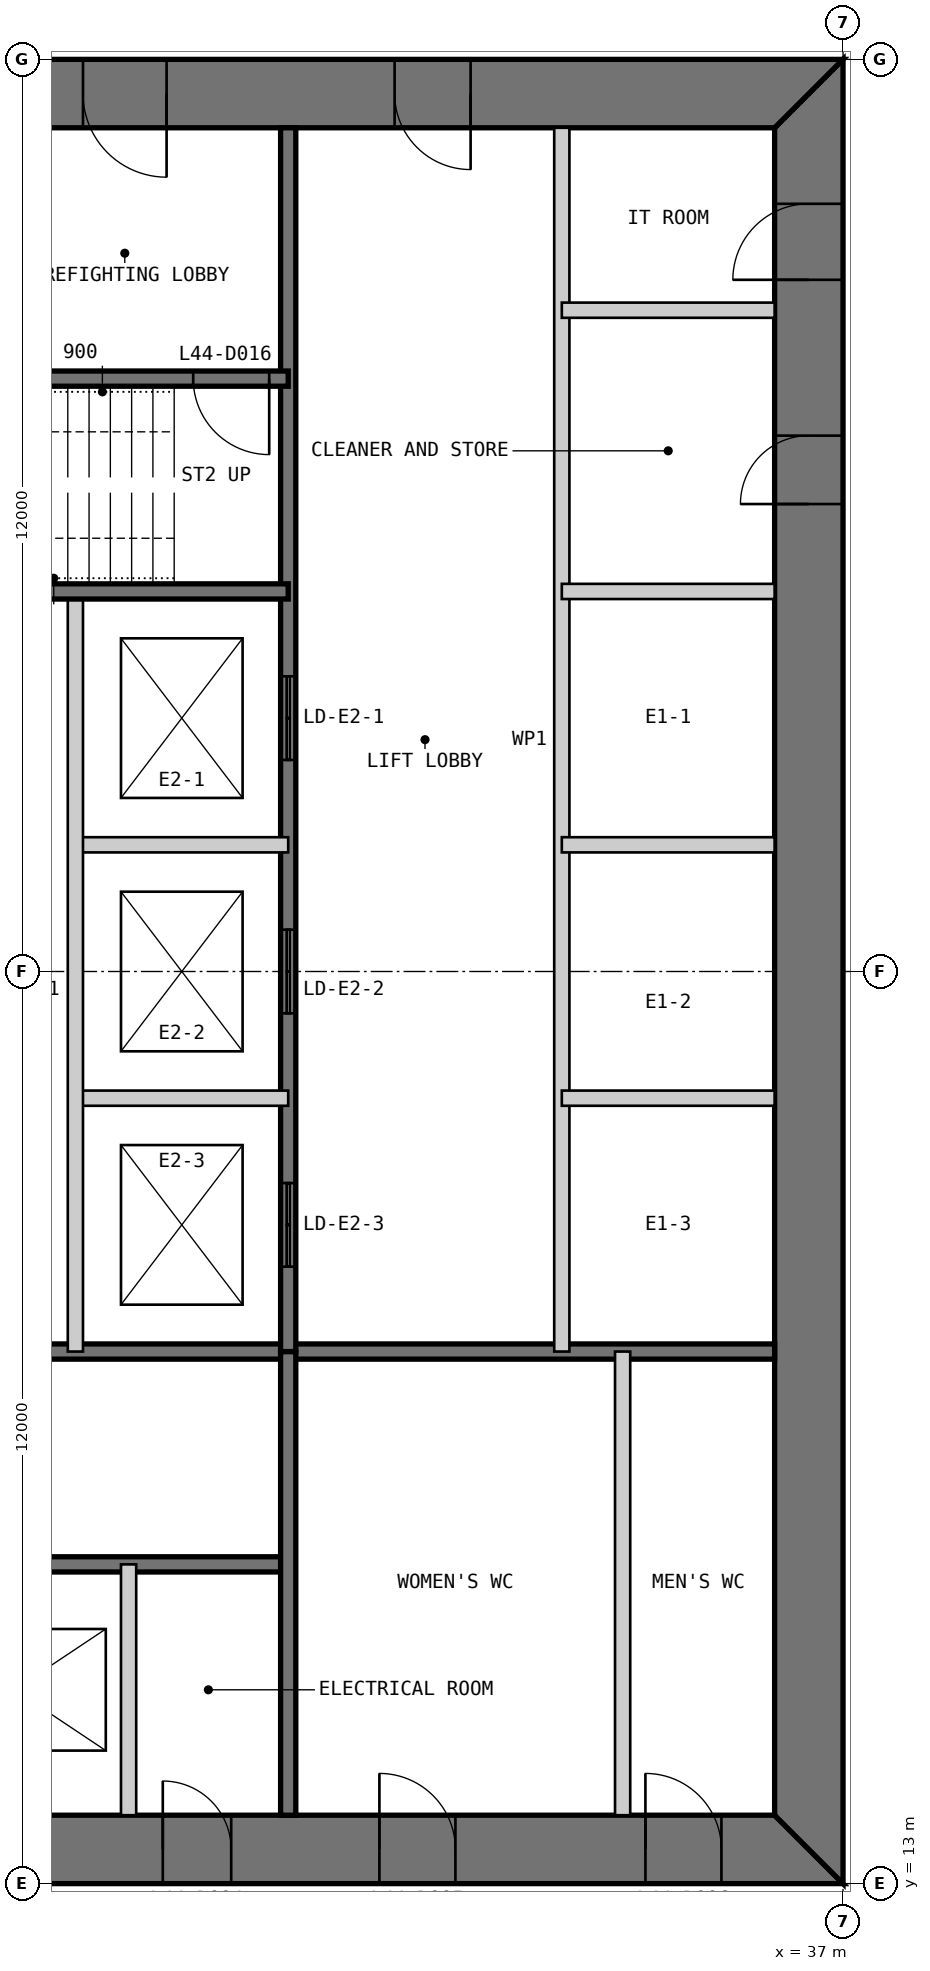
"""IFC4 building model, lengths in metres.
Left out: names, types, materials, properties, quantities, classifications, styles, units other than length and angle.
Written with IfcOpenShell. Run it as: python <this file> out.ifc"""

import sys

from ifc_helpers import new_model, si_unit, direction, frame, frame_2d, origin, place, context, subcontext, project, spatial, polyline, rectangle, outline, extrude, element, fill, save


model = new_model("IFC4")
c1 = context("Model", 3, precision=1e-05, world=origin(), true_north=direction((0.0, 1.0)))
c2 = subcontext(c1, "Body", "Model", "MODEL_VIEW")
j1 = project(units=[si_unit("LENGTHUNIT", "METRE"), si_unit("PLANEANGLEUNIT", "RADIAN")], contexts=[c1])
p1 = place(None, origin())
s1 = spatial("IfcSite", under=j1, at=p1, CompositionType="ELEMENT")
p2 = place(p1, origin())
s2 = spatial("IfcBuilding", under=s1, at=p2, CompositionType="ELEMENT")
p3 = place(p2, frame((0.0, 0.0, 189.8)))
s3 = spatial("IfcBuildingStorey", under=s2, at=p3, CompositionType="ELEMENT", Elevation=189.8)
p4 = place(p3, frame((13.0, 13.45, 0.0), z_axis=(0.0, 0.0, 1.0), x_axis=(1.0, 0.0, 0.0)))
e1 = element("IfcWall", 1, at=p4, inside=s3, PredefinedType="SHEAR", context=c2, shape_type="SweptSolid", body=[
    extrude(outline(polyline([(0.0, -0.45), (24.0, -0.45), (23.1, 0.45), (0.9, 0.45), (0.0, -0.45)])), origin(), (0.0, 0.0, 1.0), 4.0),
])
p5 = place(p4, frame((4.9, 0.0, 0.0)))
e2 = element("IfcOpeningElement", 2, at=p5, cuts=e1, PredefinedType="OPENING", context=c2, shape_type="SweptSolid", body=[
    extrude(rectangle(XDim=1.0, YDim=2.2, at=frame_2d((0.5, 1.1))), frame((0.0, 0.46, 0.0), z_axis=(0.0, -1.0, 0.0), x_axis=(1.0, 0.0, 0.0)), (0.0, 0.0, 1.0), 0.92),
])
p6 = place(p4, frame((8.9, 0.0, 0.0)))
e3 = element("IfcOpeningElement", 3, at=p6, cuts=e1, PredefinedType="OPENING", context=c2, shape_type="SweptSolid", body=[
    extrude(rectangle(XDim=1.1, YDim=2.2, at=frame_2d((0.55, 1.1))), frame((0.0, 0.46, 0.0), z_axis=(0.0, -1.0, 0.0), x_axis=(1.0, 0.0, 0.0)), (0.0, 0.0, 1.0), 0.92),
])
p7 = place(p4, frame((15.05, 0.0, 0.0)))
e4 = element("IfcOpeningElement", 4, at=p7, cuts=e1, PredefinedType="OPENING", context=c2, shape_type="SweptSolid", body=[
    extrude(rectangle(XDim=0.9, YDim=2.2, at=frame_2d((0.45, 1.1))), frame((0.0, 0.46, 0.0), z_axis=(0.0, -1.0, 0.0), x_axis=(1.0, 0.0, 0.0)), (0.0, 0.0, 1.0), 0.92),
])
p8 = place(p4, frame((17.9, 0.0, 0.0)))
e5 = element("IfcOpeningElement", 5, at=p8, cuts=e1, PredefinedType="OPENING", context=c2, shape_type="SweptSolid", body=[
    extrude(rectangle(XDim=1.0, YDim=2.2, at=frame_2d((0.5, 1.1))), frame((0.0, 0.46, 0.0), z_axis=(0.0, -1.0, 0.0), x_axis=(1.0, 0.0, 0.0)), (0.0, 0.0, 1.0), 0.92),
])
p9 = place(p4, frame((21.4, 0.0, 0.0)))
e6 = element("IfcOpeningElement", 6, at=p9, cuts=e1, PredefinedType="OPENING", context=c2, shape_type="SweptSolid", body=[
    extrude(rectangle(XDim=1.0, YDim=2.2, at=frame_2d((0.5, 1.1))), frame((0.0, 0.46, 0.0), z_axis=(0.0, -1.0, 0.0), x_axis=(1.0, 0.0, 0.0)), (0.0, 0.0, 1.0), 0.92),
])
p10 = place(p3, frame((36.55, 13.9, 0.0), z_axis=(0.0, 0.0, 1.0), x_axis=(0.0, 1.0, 0.0)))
e7 = element("IfcWall", 7, at=p10, inside=s3, PredefinedType="SHEAR", context=c2, shape_type="SweptSolid", body=[
    extrude(outline(polyline([(-0.9, -0.45), (23.1, -0.45), (22.2, 0.45), (0.0, 0.45), (-0.9, -0.45)])), origin(), (0.0, 0.0, 1.0), 4.0),
])
p11 = place(p10, frame((20.2, 0.0, 0.0)))
e8 = element("IfcOpeningElement", 8, at=p11, cuts=e7, PredefinedType="OPENING", context=c2, shape_type="SweptSolid", body=[
    extrude(rectangle(XDim=1.0, YDim=2.2, at=frame_2d((0.5, 1.1))), frame((0.0, 0.46, 0.0), z_axis=(0.0, -1.0, 0.0), x_axis=(1.0, 0.0, 0.0)), (0.0, 0.0, 1.0), 0.92),
])
p12 = place(p10, frame((17.25, 0.0, 0.0)))
e9 = element("IfcOpeningElement", 9, at=p12, cuts=e7, PredefinedType="OPENING", context=c2, shape_type="SweptSolid", body=[
    extrude(rectangle(XDim=0.9, YDim=2.2, at=frame_2d((0.45, 1.1))), frame((0.0, 0.46, 0.0), z_axis=(0.0, -1.0, 0.0), x_axis=(1.0, 0.0, 0.0)), (0.0, 0.0, 1.0), 0.92),
])
p13 = place(p3, frame((37.0, 36.55, 0.0), z_axis=(0.0, 0.0, 1.0), x_axis=(-1.0, 0.0, 0.0)))
e10 = element("IfcWall", 10, at=p13, inside=s3, PredefinedType="SHEAR", context=c2, shape_type="SweptSolid", body=[
    extrude(outline(polyline([(0.0, -0.45), (24.0, -0.45), (23.1, 0.45), (0.9, 0.45), (0.0, -0.45)])), origin(), (0.0, 0.0, 1.0), 4.0),
])
p14 = place(p13, frame((4.9, 0.0, 0.0)))
e11 = element("IfcOpeningElement", 11, at=p14, cuts=e10, PredefinedType="OPENING", context=c2, shape_type="SweptSolid", body=[
    extrude(rectangle(XDim=1.0, YDim=2.2, at=frame_2d((0.5, 1.1))), frame((0.0, 0.46, 0.0), z_axis=(0.0, -1.0, 0.0), x_axis=(1.0, 0.0, 0.0)), (0.0, 0.0, 1.0), 0.92),
])
p15 = place(p13, frame((8.9, 0.0, 0.0)))
e12 = element("IfcOpeningElement", 12, at=p15, cuts=e10, PredefinedType="OPENING", context=c2, shape_type="SweptSolid", body=[
    extrude(rectangle(XDim=1.1, YDim=2.2, at=frame_2d((0.55, 1.1))), frame((0.0, 0.46, 0.0), z_axis=(0.0, -1.0, 0.0), x_axis=(1.0, 0.0, 0.0)), (0.0, 0.0, 1.0), 0.92),
])
p16 = place(p13, frame((15.05, 0.0, 0.0)))
e13 = element("IfcOpeningElement", 13, at=p16, cuts=e10, PredefinedType="OPENING", context=c2, shape_type="SweptSolid", body=[
    extrude(rectangle(XDim=0.9, YDim=2.2, at=frame_2d((0.45, 1.1))), frame((0.0, 0.46, 0.0), z_axis=(0.0, -1.0, 0.0), x_axis=(1.0, 0.0, 0.0)), (0.0, 0.0, 1.0), 0.92),
])
p17 = place(p13, frame((17.9, 0.0, 0.0)))
e14 = element("IfcOpeningElement", 14, at=p17, cuts=e10, PredefinedType="OPENING", context=c2, shape_type="SweptSolid", body=[
    extrude(rectangle(XDim=1.0, YDim=2.2, at=frame_2d((0.5, 1.1))), frame((0.0, 0.46, 0.0), z_axis=(0.0, -1.0, 0.0), x_axis=(1.0, 0.0, 0.0)), (0.0, 0.0, 1.0), 0.92),
])
p18 = place(p13, frame((21.4, 0.0, 0.0)))
e15 = element("IfcOpeningElement", 15, at=p18, cuts=e10, PredefinedType="OPENING", context=c2, shape_type="SweptSolid", body=[
    extrude(rectangle(XDim=1.0, YDim=2.2, at=frame_2d((0.5, 1.1))), frame((0.0, 0.46, 0.0), z_axis=(0.0, -1.0, 0.0), x_axis=(1.0, 0.0, 0.0)), (0.0, 0.0, 1.0), 0.92),
])
p19 = place(p3, frame((20.3, 17.2, 0.0), z_axis=(0.0, 0.0, 1.0), x_axis=(1.0, 0.0, 0.0)))
e16 = element("IfcWall", 16, at=p19, inside=s3, PredefinedType="SOLIDWALL", context=c2, shape_type="SweptSolid", body=[
    extrude(rectangle(XDim=9.4, YDim=0.2, at=frame_2d((4.7, 0.0))), origin(), (0.0, 0.0, 1.0), 3.8),
])
p20 = place(p19, frame((0.25, 0.0, 0.0)))
e17 = element("IfcOpeningElement", 17, at=p20, cuts=e16, PredefinedType="OPENING", context=c2, shape_type="SweptSolid", body=[
    extrude(rectangle(XDim=1.0, YDim=2.2, at=frame_2d((0.5, 1.1))), frame((0.0, 0.11, 0.0), z_axis=(0.0, -1.0, 0.0), x_axis=(1.0, 0.0, 0.0)), (0.0, 0.0, 1.0), 0.22),
])
p21 = place(p3, frame((20.3, 20.0, 0.0), z_axis=(0.0, 0.0, 1.0), x_axis=(1.0, 0.0, 0.0)))
e18 = element("IfcWall", 18, at=p21, inside=s3, PredefinedType="SOLIDWALL", context=c2, shape_type="SweptSolid", body=[
    extrude(rectangle(XDim=15.8, YDim=0.2, at=frame_2d((7.9, 0.0))), origin(), (0.0, 0.0, 1.0), 3.8),
])
p22 = place(p3, frame((27.6, 13.9, 0.0), z_axis=(0.0, 0.0, 1.0), x_axis=(0.0, 1.0, 0.0)))
e19 = element("IfcWall", 19, at=p22, inside=s3, PredefinedType="PARTITIONING", context=c2, shape_type="SweptSolid", body=[
    extrude(rectangle(XDim=3.3, YDim=0.2, at=frame_2d((1.65, 0.0))), origin(), (0.0, 0.0, 1.0), 3.8),
])
p23 = place(p3, frame((29.7, 13.9, 0.0), z_axis=(0.0, 0.0, 1.0), x_axis=(0.0, 1.0, 0.0)))
e20 = element("IfcWall", 20, at=p23, inside=s3, PredefinedType="SOLIDWALL", context=c2, shape_type="SweptSolid", body=[
    extrude(rectangle(XDim=6.1, YDim=0.2, at=frame_2d((3.05, 0.0))), origin(), (0.0, 0.0, 1.0), 3.8),
])
p24 = place(p3, frame((34.1, 13.9, 0.0), z_axis=(0.0, 0.0, 1.0), x_axis=(0.0, 1.0, 0.0)))
e21 = element("IfcWall", 21, at=p24, inside=s3, PredefinedType="PARTITIONING", context=c2, shape_type="SweptSolid", body=[
    extrude(rectangle(XDim=6.1, YDim=0.2, at=frame_2d((3.05, 0.0))), origin(), (0.0, 0.0, 1.0), 3.8),
])
p25 = place(p3, frame((33.3, 36.1, 0.0), z_axis=(0.0, 0.0, 1.0), x_axis=(0.0, -1.0, 0.0)))
e22 = element("IfcWall", 22, at=p25, inside=s3, PredefinedType="PARTITIONING", context=c2, shape_type="SweptSolid", body=[
    extrude(rectangle(XDim=16.1, YDim=0.2, at=frame_2d((8.05, 0.0))), origin(), (0.0, 0.0, 1.0), 3.8),
])
p26 = place(p3, frame((29.7, 36.1, 0.0), z_axis=(0.0, 0.0, 1.0), x_axis=(0.0, -1.0, 0.0)))
e23 = element("IfcWall", 23, at=p26, inside=s3, PredefinedType="SOLIDWALL", context=c2, shape_type="SweptSolid", body=[
    extrude(rectangle(XDim=16.1, YDim=0.2, at=frame_2d((8.05, 0.0))), origin(), (0.0, 0.0, 1.0), 3.8),
])
p27 = place(p26, frame((7.217, 0.0, 0.0)))
e24 = element("IfcOpeningElement", 24, at=p27, cuts=e23, PredefinedType="OPENING", context=c2, shape_type="SweptSolid", body=[
    extrude(rectangle(XDim=1.1, YDim=2.2, at=frame_2d((0.55, 1.1))), frame((0.0, 0.11, 0.0), z_axis=(0.0, -1.0, 0.0), x_axis=(1.0, 0.0, 0.0)), (0.0, 0.0, 1.0), 0.22),
])
p28 = place(p26, frame((10.55, 0.0, 0.0)))
e25 = element("IfcOpeningElement", 25, at=p28, cuts=e23, PredefinedType="OPENING", context=c2, shape_type="SweptSolid", body=[
    extrude(rectangle(XDim=1.1, YDim=2.2, at=frame_2d((0.55, 1.1))), frame((0.0, 0.11, 0.0), z_axis=(0.0, -1.0, 0.0), x_axis=(1.0, 0.0, 0.0)), (0.0, 0.0, 1.0), 0.22),
])
p29 = place(p26, frame((13.883, 0.0, 0.0)))
e26 = element("IfcOpeningElement", 26, at=p29, cuts=e23, PredefinedType="OPENING", context=c2, shape_type="SweptSolid", body=[
    extrude(rectangle(XDim=1.1, YDim=2.2, at=frame_2d((0.55, 1.1))), frame((0.0, 0.11, 0.0), z_axis=(0.0, -1.0, 0.0), x_axis=(1.0, 0.0, 0.0)), (0.0, 0.0, 1.0), 0.22),
])
for number, where, z_axis, x_axis in (
    (27, (36.1, 30.0, 0.0), (0.0, 0.0, 1.0), (-1.0, 0.0, 0.0)),
    (28, (36.1, 26.667, 0.0), (0.0, 0.0, 1.0), (-1.0, 0.0, 0.0)),
    (29, (36.1, 23.333, 0.0), (0.0, 0.0, 1.0), (-1.0, 0.0, 0.0)),
    (30, (29.7, 26.667, 0.0), (0.0, 0.0, 1.0), (-1.0, 0.0, 0.0)),
    (31, (29.7, 23.333, 0.0), (0.0, 0.0, 1.0), (-1.0, 0.0, 0.0)),
):
    element("IfcWall", number, at=place(p3, frame(where, z_axis=z_axis, x_axis=x_axis)), inside=s3, PredefinedType="PARTITIONING", context=c2, shape_type="SweptSolid", body=[
        extrude(rectangle(XDim=2.8, YDim=0.2, at=frame_2d((1.4, 0.0))), origin(), (0.0, 0.0, 1.0), 3.8),
    ])
p30 = place(p3, frame((26.9, 30.0, 0.0), z_axis=(0.0, 0.0, 1.0), x_axis=(0.0, -1.0, 0.0)))
e32 = element("IfcWall", 32, at=p30, inside=s3, PredefinedType="PARTITIONING", context=c2, shape_type="SweptSolid", body=[
    extrude(rectangle(XDim=10.0, YDim=0.2, at=frame_2d((5.0, 0.0))), origin(), (0.0, 0.0, 1.0), 3.8),
])
p31 = place(p3, frame((29.7, 32.8, 0.0), z_axis=(0.0, 0.0, 1.0), x_axis=(-1.0, 0.0, 0.0)))
e33 = element("IfcWall", 33, at=p31, inside=s3, PredefinedType="SOLIDWALL", context=c2, shape_type="SweptSolid", body=[
    extrude(rectangle(XDim=9.4, YDim=0.2, at=frame_2d((4.7, 0.0))), origin(), (0.0, 0.0, 1.0), 3.8),
])
p32 = place(p31, frame((0.25, 0.0, 0.0)))
e34 = element("IfcOpeningElement", 34, at=p32, cuts=e33, PredefinedType="OPENING", context=c2, shape_type="SweptSolid", body=[
    extrude(rectangle(XDim=1.0, YDim=2.2, at=frame_2d((0.5, 1.1))), frame((0.0, 0.11, 0.0), z_axis=(0.0, -1.0, 0.0), x_axis=(1.0, 0.0, 0.0)), (0.0, 0.0, 1.0), 0.22),
])
p33 = place(p3, frame((29.7, 30.0, 0.0), z_axis=(0.0, 0.0, 1.0), x_axis=(-1.0, 0.0, 0.0)))
e35 = element("IfcWall", 35, at=p33, inside=s3, PredefinedType="SOLIDWALL", context=c2, shape_type="SweptSolid", body=[
    extrude(rectangle(XDim=15.8, YDim=0.2, at=frame_2d((7.9, 0.0))), origin(), (0.0, 0.0, 1.0), 3.8),
])
p34 = place(p3, frame((36.1, 33.7, 0.0), z_axis=(0.0, 0.0, 1.0), x_axis=(-1.0, 0.0, 0.0)))
e36 = element("IfcWall", 36, at=p34, inside=s3, PredefinedType="PARTITIONING", context=c2, shape_type="SweptSolid", body=[
    extrude(rectangle(XDim=2.8, YDim=0.2, at=frame_2d((1.4, 0.0))), origin(), (0.0, 0.0, 1.0), 3.8),
])
p35 = place(p7, origin())
e37 = element("IfcDoor", 37, at=p35, inside=s3, OperationType="SINGLE_SWING_LEFT", PredefinedType="DOOR", context=c2, shape_type="SweptSolid", body=[
    extrude(rectangle(XDim=0.9, YDim=2.2, at=frame_2d((0.45, 1.1))), frame((0.0, 0.025, 0.0), z_axis=(0.0, -1.0, 0.0), x_axis=(1.0, 0.0, 0.0)), (0.0, 0.0, 1.0), 0.05),
    extrude(outline(polyline([(0.0, 0.0), (0.04, 0.0), (0.04, 2.16), (0.86, 2.16), (0.86, 0.0), (0.9, 0.0), (0.9, 2.2), (0.0, 2.2), (0.0, 0.0)])), frame((0.0, 0.3, 0.0), z_axis=(0.0, -1.0, 0.0), x_axis=(1.0, 0.0, 0.0)), (0.0, 0.0, 1.0), 0.6),
])
fill(e4, e37)
p36 = place(p8, origin())
e38 = element("IfcDoor", 38, at=p36, inside=s3, OperationType="SINGLE_SWING_LEFT", PredefinedType="DOOR", context=c2, shape_type="SweptSolid", body=[
    extrude(rectangle(XDim=1.0, YDim=2.2, at=frame_2d((0.5, 1.1))), frame((0.0, 0.025, 0.0), z_axis=(0.0, -1.0, 0.0), x_axis=(1.0, 0.0, 0.0)), (0.0, 0.0, 1.0), 0.05),
    extrude(outline(polyline([(0.0, 0.0), (0.04, 0.0), (0.04, 2.16), (0.96, 2.16), (0.96, 0.0), (1.0, 0.0), (1.0, 2.2), (0.0, 2.2), (0.0, 0.0)])), frame((0.0, 0.3, 0.0), z_axis=(0.0, -1.0, 0.0), x_axis=(1.0, 0.0, 0.0)), (0.0, 0.0, 1.0), 0.6),
])
fill(e5, e38)
p37 = place(p9, origin())
e39 = element("IfcDoor", 39, at=p37, inside=s3, OperationType="SINGLE_SWING_LEFT", PredefinedType="DOOR", context=c2, shape_type="SweptSolid", body=[
    extrude(rectangle(XDim=1.0, YDim=2.2, at=frame_2d((0.5, 1.1))), frame((0.0, 0.025, 0.0), z_axis=(0.0, -1.0, 0.0), x_axis=(1.0, 0.0, 0.0)), (0.0, 0.0, 1.0), 0.05),
    extrude(outline(polyline([(0.0, 0.0), (0.04, 0.0), (0.04, 2.16), (0.96, 2.16), (0.96, 0.0), (1.0, 0.0), (1.0, 2.2), (0.0, 2.2), (0.0, 0.0)])), frame((0.0, 0.3, 0.0), z_axis=(0.0, -1.0, 0.0), x_axis=(1.0, 0.0, 0.0)), (0.0, 0.0, 1.0), 0.6),
])
fill(e6, e39)
p38 = place(p14, origin())
e40 = element("IfcDoor", 40, at=p38, inside=s3, OperationType="SINGLE_SWING_LEFT", PredefinedType="DOOR", context=c2, shape_type="SweptSolid", body=[
    extrude(rectangle(XDim=1.0, YDim=2.2, at=frame_2d((0.5, 1.1))), frame((0.0, 0.025, 0.0), z_axis=(0.0, -1.0, 0.0), x_axis=(1.0, 0.0, 0.0)), (0.0, 0.0, 1.0), 0.05),
    extrude(outline(polyline([(0.0, 0.0), (0.04, 0.0), (0.04, 2.16), (0.96, 2.16), (0.96, 0.0), (1.0, 0.0), (1.0, 2.2), (0.0, 2.2), (0.0, 0.0)])), frame((0.0, 0.3, 0.0), z_axis=(0.0, -1.0, 0.0), x_axis=(1.0, 0.0, 0.0)), (0.0, 0.0, 1.0), 0.6),
])
fill(e11, e40)
p39 = place(p15, origin())
e41 = element("IfcDoor", 41, at=p39, inside=s3, OperationType="SINGLE_SWING_LEFT", PredefinedType="DOOR", context=c2, shape_type="SweptSolid", body=[
    extrude(rectangle(XDim=1.1, YDim=2.2, at=frame_2d((0.55, 1.1))), frame((0.0, 0.025, 0.0), z_axis=(0.0, -1.0, 0.0), x_axis=(1.0, 0.0, 0.0)), (0.0, 0.0, 1.0), 0.05),
    extrude(outline(polyline([(0.0, 0.0), (0.04, 0.0), (0.04, 2.16), (1.06, 2.16), (1.06, 0.0), (1.1, 0.0), (1.1, 2.2), (0.0, 2.2), (0.0, 0.0)])), frame((0.0, 0.3, 0.0), z_axis=(0.0, -1.0, 0.0), x_axis=(1.0, 0.0, 0.0)), (0.0, 0.0, 1.0), 0.6),
])
fill(e12, e41)
p40 = place(p32, origin())
e42 = element("IfcDoor", 42, at=p40, inside=s3, OperationType="SINGLE_SWING_LEFT", PredefinedType="DOOR", context=c2, shape_type="SweptSolid", body=[
    extrude(rectangle(XDim=1.0, YDim=2.2, at=frame_2d((0.5, 1.1))), frame((0.0, 0.025, 0.0), z_axis=(0.0, -1.0, 0.0), x_axis=(1.0, 0.0, 0.0)), (0.0, 0.0, 1.0), 0.05),
])
fill(e34, e42)
p41 = place(p11, origin())
e43 = element("IfcDoor", 43, at=p41, inside=s3, OperationType="SINGLE_SWING_LEFT", PredefinedType="DOOR", context=c2, shape_type="SweptSolid", body=[
    extrude(rectangle(XDim=1.0, YDim=2.2, at=frame_2d((0.5, 1.1))), frame((0.0, 0.025, 0.0), z_axis=(0.0, -1.0, 0.0), x_axis=(1.0, 0.0, 0.0)), (0.0, 0.0, 1.0), 0.05),
    extrude(outline(polyline([(0.0, 0.0), (0.04, 0.0), (0.04, 2.16), (0.96, 2.16), (0.96, 0.0), (1.0, 0.0), (1.0, 2.2), (0.0, 2.2), (0.0, 0.0)])), frame((0.0, 0.3, 0.0), z_axis=(0.0, -1.0, 0.0), x_axis=(1.0, 0.0, 0.0)), (0.0, 0.0, 1.0), 0.6),
])
fill(e8, e43)
p42 = place(p12, origin())
e44 = element("IfcDoor", 44, at=p42, inside=s3, OperationType="SINGLE_SWING_LEFT", PredefinedType="DOOR", context=c2, shape_type="SweptSolid", body=[
    extrude(rectangle(XDim=0.9, YDim=2.2, at=frame_2d((0.45, 1.1))), frame((0.0, 0.025, 0.0), z_axis=(0.0, -1.0, 0.0), x_axis=(1.0, 0.0, 0.0)), (0.0, 0.0, 1.0), 0.05),
    extrude(outline(polyline([(0.0, 0.0), (0.04, 0.0), (0.04, 2.16), (0.86, 2.16), (0.86, 0.0), (0.9, 0.0), (0.9, 2.2), (0.0, 2.2), (0.0, 0.0)])), frame((0.0, 0.3, 0.0), z_axis=(0.0, -1.0, 0.0), x_axis=(1.0, 0.0, 0.0)), (0.0, 0.0, 1.0), 0.6),
])
fill(e9, e44)
p43 = place(p27, origin())
e45 = element("IfcDoor", 45, at=p43, inside=s3, OperationType="DOUBLE_DOOR_SLIDING", PredefinedType="DOOR", context=c2, shape_type="SweptSolid", body=[
    extrude(rectangle(XDim=1.1, YDim=2.2, at=frame_2d((0.55, 1.1))), frame((0.0, 0.025, 0.0), z_axis=(0.0, -1.0, 0.0), x_axis=(1.0, 0.0, 0.0)), (0.0, 0.0, 1.0), 0.05),
])
fill(e24, e45)
p44 = place(p28, origin())
e46 = element("IfcDoor", 46, at=p44, inside=s3, OperationType="DOUBLE_DOOR_SLIDING", PredefinedType="DOOR", context=c2, shape_type="SweptSolid", body=[
    extrude(rectangle(XDim=1.1, YDim=2.2, at=frame_2d((0.55, 1.1))), frame((0.0, 0.025, 0.0), z_axis=(0.0, -1.0, 0.0), x_axis=(1.0, 0.0, 0.0)), (0.0, 0.0, 1.0), 0.05),
])
fill(e25, e46)
p45 = place(p29, origin())
e47 = element("IfcDoor", 47, at=p45, inside=s3, OperationType="DOUBLE_DOOR_SLIDING", PredefinedType="DOOR", context=c2, shape_type="SweptSolid", body=[
    extrude(rectangle(XDim=1.1, YDim=2.2, at=frame_2d((0.55, 1.1))), frame((0.0, 0.025, 0.0), z_axis=(0.0, -1.0, 0.0), x_axis=(1.0, 0.0, 0.0)), (0.0, 0.0, 1.0), 0.05),
])
fill(e26, e47)
save(model, sys.argv[1])
